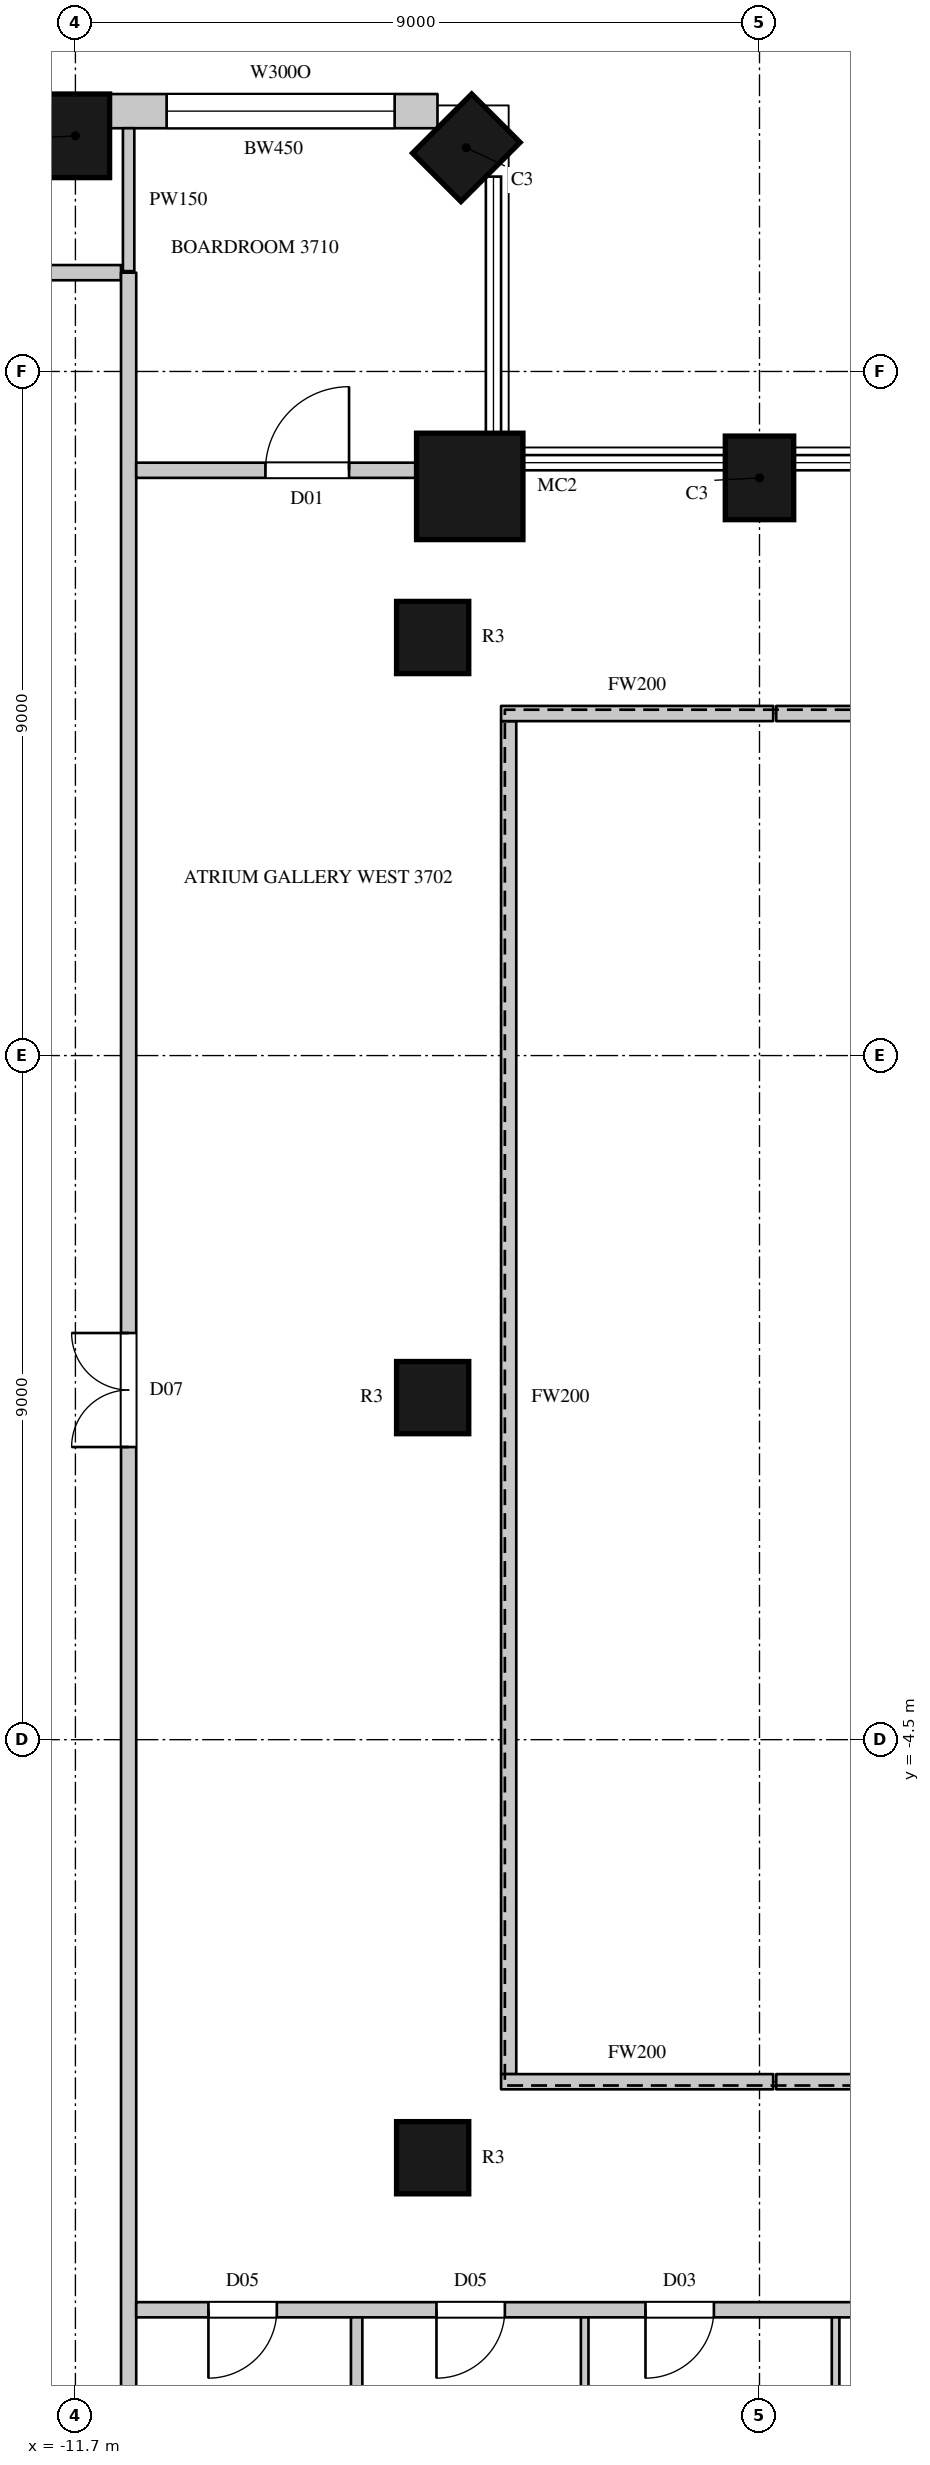
"""IFC4 building model, lengths in metres.
Left out: names, types, materials, properties, quantities, classifications, styles, units other than length and angle.
Written with IfcOpenShell. Run it as: python <this file> out.ifc"""

import sys

from ifc_helpers import new_model, si_unit, direction, frame, frame_2d, origin, origin_2d, place, context, subcontext, project, spatial, rectangle, circle, extrude, element, fill, save


model = new_model("IFC4")
c1 = context("Model", 3, precision=1e-05, world=origin(), true_north=direction((0.0, 1.0)))
c2 = subcontext(c1, "Body", "Model", "MODEL_VIEW")
j1 = project(units=[si_unit("LENGTHUNIT", "METRE"), si_unit("PLANEANGLEUNIT", "RADIAN")], contexts=[c1])
p1 = place(None, origin())
s1 = spatial("IfcSite", under=j1, at=p1, CompositionType="ELEMENT")
p2 = place(p1, origin())
s2 = spatial("IfcBuilding", under=s1, at=p2, CompositionType="ELEMENT")
p3 = place(p2, frame((0.0, 0.0, 172.8)))
s3 = spatial("IfcBuildingStorey", under=s2, at=p3, CompositionType="ELEMENT", Elevation=172.8)
p4 = place(p3, frame((-2.7, 12.1, 0.0), z_axis=(0.0, 0.0, 1.0), x_axis=(-1.0, 0.0, 0.0)))
e1 = element("IfcColumn", 1, at=p4, inside=s3, PredefinedType="COLUMN", context=c2, shape_type="SweptSolid", body=[
    extrude(rectangle(XDim=0.9, YDim=1.1, at=origin_2d()), origin(), (0.0, 0.0, 1.0), 4.1),
])
p5 = place(p3, frame((-6.512, 11.988, 0.0), z_axis=(0.0, 0.0, 1.0), x_axis=(1.0, 0.0, 0.0)))
e2 = element("IfcColumn", 2, at=p5, inside=s3, PredefinedType="COLUMN", context=c2, shape_type="SweptSolid", body=[
    extrude(circle(Radius=0.7, at=origin_2d()), origin(), (0.0, 0.0, 1.0), 4.1),
])
for number, where, z_axis, x_axis in (
    (3, (-6.557, 16.443, 0.0), (0.0, 0.0, 1.0), (-0.707, 0.707, 0.0)),
    (4, (-11.7, 16.6, 0.0), (0.0, 0.0, 1.0), (-1.0, 0.0, 0.0)),
):
    element("IfcColumn", number, at=place(p3, frame(where, z_axis=z_axis, x_axis=x_axis)), inside=s3, PredefinedType="COLUMN", context=c2, shape_type="SweptSolid", body=[
        extrude(rectangle(XDim=0.9, YDim=1.1, at=origin_2d()), origin(), (0.0, 0.0, 1.0), 4.1),
    ])
for number, where, z_axis, x_axis in (
    (5, (-7.0, -10.0, 0.0), (0.0, 0.0, 1.0), (1.0, 0.0, 0.0)),
    (6, (-7.0, 0.0, 0.0), (0.0, 0.0, 1.0), (1.0, 0.0, 0.0)),
    (7, (-7.0, 10.0, 0.0), (0.0, 0.0, 1.0), (1.0, 0.0, 0.0)),
):
    element("IfcColumn", number, at=place(p3, frame(where, z_axis=z_axis, x_axis=x_axis)), inside=s3, PredefinedType="COLUMN", context=c2, shape_type="SweptSolid", body=[
        extrude(circle(Radius=0.475, at=origin_2d()), origin(), (0.0, 0.0, 1.0), 4.1),
    ])
p6 = place(p3, frame((-6.936, 16.925, 0.0), z_axis=(0.0, 0.0, 1.0), x_axis=(-1.0, 0.0, 0.0)))
e8 = element("IfcWall", 8, at=p6, inside=s3, PredefinedType="SOLIDWALL", context=c2, shape_type="SweptSolid", body=[
    extrude(rectangle(XDim=4.314, YDim=0.45, at=frame_2d((2.157, 0.0))), origin(), (0.0, 0.0, 1.0), 3.8),
])
p7 = place(p6, frame((0.564, 0.0, 1.05)))
e9 = element("IfcOpeningElement", 9, at=p7, cuts=e8, PredefinedType="OPENING", context=c2, shape_type="SweptSolid", body=[
    extrude(rectangle(XDim=3.0, YDim=2.4, at=frame_2d((1.5, 1.2))), frame((0.0, 0.235, 0.0), z_axis=(0.0, -1.0, 0.0), x_axis=(1.0, 0.0, 0.0)), (0.0, 0.0, 1.0), 0.47),
])
p8 = place(p3, frame((-13.97, 14.8, 0.0), z_axis=(0.0, 0.0, 1.0), x_axis=(1.0, 0.0, 0.0)))
e10 = element("IfcWall", 10, at=p8, inside=s3, PredefinedType="PARTITIONING", context=c2, shape_type="SweptSolid", body=[
    extrude(rectangle(XDim=2.87, YDim=0.2, at=frame_2d((1.435, 0.0))), origin(), (0.0, 0.0, 1.0), 3.8),
])
p9 = place(p3, frame((-11.0, -14.8, 0.0), z_axis=(0.0, 0.0, 1.0), x_axis=(0.0, 1.0, 0.0)))
e11 = element("IfcWall", 11, at=p9, inside=s3, PredefinedType="PARTITIONING", context=c2, shape_type="SweptSolid", body=[
    extrude(rectangle(XDim=29.6, YDim=0.2, at=frame_2d((14.8, 0.0))), origin(), (0.0, 0.0, 1.0), 3.8),
])
p10 = place(p9, frame((14.15, 0.0, 0.0)))
e12 = element("IfcOpeningElement", 12, at=p10, cuts=e11, PredefinedType="OPENING", context=c2, shape_type="SweptSolid", body=[
    extrude(rectangle(XDim=1.5, YDim=2.4, at=frame_2d((0.75, 1.2))), frame((0.0, 0.11, 0.0), z_axis=(0.0, -1.0, 0.0), x_axis=(1.0, 0.0, 0.0)), (0.0, 0.0, 1.0), 0.22),
])
p11 = place(p3, frame((-10.9, -12.0, 0.0), z_axis=(0.0, 0.0, 1.0), x_axis=(1.0, 0.0, 0.0)))
e13 = element("IfcWall", 13, at=p11, inside=s3, PredefinedType="PARTITIONING", context=c2, shape_type="SweptSolid", body=[
    extrude(rectangle(XDim=21.8, YDim=0.2, at=frame_2d((10.9, 0.0))), origin(), (0.0, 0.0, 1.0), 3.8),
])
p12 = place(p11, frame((0.95, 0.0, 0.0)))
e14 = element("IfcOpeningElement", 14, at=p12, cuts=e13, PredefinedType="OPENING", context=c2, shape_type="SweptSolid", body=[
    extrude(rectangle(XDim=0.9, YDim=2.2, at=frame_2d((0.45, 1.1))), frame((0.0, 0.11, 0.0), z_axis=(0.0, -1.0, 0.0), x_axis=(1.0, 0.0, 0.0)), (0.0, 0.0, 1.0), 0.22),
])
p13 = place(p11, frame((3.95, 0.0, 0.0)))
e15 = element("IfcOpeningElement", 15, at=p13, cuts=e13, PredefinedType="OPENING", context=c2, shape_type="SweptSolid", body=[
    extrude(rectangle(XDim=0.9, YDim=2.2, at=frame_2d((0.45, 1.1))), frame((0.0, 0.11, 0.0), z_axis=(0.0, -1.0, 0.0), x_axis=(1.0, 0.0, 0.0)), (0.0, 0.0, 1.0), 0.22),
])
p14 = place(p11, frame((6.7, 0.0, 0.0)))
e16 = element("IfcOpeningElement", 16, at=p14, cuts=e13, PredefinedType="OPENING", context=c2, shape_type="SweptSolid", body=[
    extrude(rectangle(XDim=0.9, YDim=2.2, at=frame_2d((0.45, 1.1))), frame((0.0, 0.11, 0.0), z_axis=(0.0, -1.0, 0.0), x_axis=(1.0, 0.0, 0.0)), (0.0, 0.0, 1.0), 0.22),
])
p15 = place(p11, frame((10.0, 0.0, 0.0)))
e17 = element("IfcOpeningElement", 17, at=p15, cuts=e13, PredefinedType="OPENING", context=c2, shape_type="SweptSolid", body=[
    extrude(rectangle(XDim=0.9, YDim=2.2, at=frame_2d((0.45, 1.1))), frame((0.0, 0.11, 0.0), z_axis=(0.0, -1.0, 0.0), x_axis=(1.0, 0.0, 0.0)), (0.0, 0.0, 1.0), 0.22),
])
p16 = place(p11, frame((13.55, 0.0, 0.0)))
e18 = element("IfcOpeningElement", 18, at=p16, cuts=e13, PredefinedType="OPENING", context=c2, shape_type="SweptSolid", body=[
    extrude(rectangle(XDim=0.9, YDim=2.2, at=frame_2d((0.45, 1.1))), frame((0.0, 0.11, 0.0), z_axis=(0.0, -1.0, 0.0), x_axis=(1.0, 0.0, 0.0)), (0.0, 0.0, 1.0), 0.22),
])
p17 = place(p11, frame((15.8, 0.0, 0.0)))
e19 = element("IfcOpeningElement", 19, at=p17, cuts=e13, PredefinedType="OPENING", context=c2, shape_type="SweptSolid", body=[
    extrude(rectangle(XDim=1.1, YDim=2.4, at=frame_2d((0.55, 1.2))), frame((0.0, 0.11, 0.0), z_axis=(0.0, -1.0, 0.0), x_axis=(1.0, 0.0, 0.0)), (0.0, 0.0, 1.0), 0.22),
])
p18 = place(p11, frame((18.0, 0.0, 0.0)))
e20 = element("IfcOpeningElement", 20, at=p18, cuts=e13, PredefinedType="OPENING", context=c2, shape_type="SweptSolid", body=[
    extrude(rectangle(XDim=1.1, YDim=2.4, at=frame_2d((0.55, 1.2))), frame((0.0, 0.11, 0.0), z_axis=(0.0, -1.0, 0.0), x_axis=(1.0, 0.0, 0.0)), (0.0, 0.0, 1.0), 0.22),
])
p19 = place(p3, frame((-10.9, 12.2, 0.0), z_axis=(0.0, 0.0, 1.0), x_axis=(1.0, 0.0, 0.0)))
e21 = element("IfcWall", 21, at=p19, inside=s3, PredefinedType="PARTITIONING", context=c2, shape_type="SweptSolid", body=[
    extrude(rectangle(XDim=3.704, YDim=0.2, at=frame_2d((1.852, 0.0))), origin(), (0.0, 0.0, 1.0), 3.8),
])
p20 = place(p19, frame((1.7, 0.0, 0.0)))
e22 = element("IfcOpeningElement", 22, at=p20, cuts=e21, PredefinedType="OPENING", context=c2, shape_type="SweptSolid", body=[
    extrude(rectangle(XDim=1.1, YDim=2.4, at=frame_2d((0.55, 1.2))), frame((0.0, 0.11, 0.0), z_axis=(0.0, -1.0, 0.0), x_axis=(1.0, 0.0, 0.0)), (0.0, 0.0, 1.0), 0.22),
])
p21 = place(p3, frame((-6.0, -8.9, 0.0), z_axis=(0.0, 0.0, 1.0), x_axis=(0.0, 1.0, 0.0)))
e23 = element("IfcWall", 23, at=p21, inside=s3, PredefinedType="PARTITIONING", context=c2, shape_type="SweptSolid", body=[
    extrude(rectangle(XDim=17.8, YDim=0.2, at=frame_2d((8.9, 0.0))), origin(), (0.0, 0.0, 1.0), 3.8),
])
for number, where, z_axis, x_axis in (
    (24, (-6.1, -9.0, 0.0), (0.0, 0.0, 1.0), (1.0, 0.0, 0.0)),
    (25, (-6.1, 9.0, 0.0), (0.0, 0.0, 1.0), (1.0, 0.0, 0.0)),
):
    element("IfcWall", number, at=place(p3, frame(where, z_axis=z_axis, x_axis=x_axis)), inside=s3, PredefinedType="PARTITIONING", context=c2, shape_type="SweptSolid", body=[
        extrude(rectangle(XDim=3.58, YDim=0.2, at=frame_2d((1.79, 0.0))), origin(), (0.0, 0.0, 1.0), 3.8),
    ])
for number, where, z_axis, x_axis in (
    (26, (-2.48, -9.0, 0.0), (0.0, 0.0, 1.0), (1.0, 0.0, 0.0)),
    (27, (-2.48, 9.0, 0.0), (0.0, 0.0, 1.0), (1.0, 0.0, 0.0)),
):
    element("IfcWall", number, at=place(p3, frame(where, z_axis=z_axis, x_axis=x_axis)), inside=s3, PredefinedType="PARTITIONING", context=c2, shape_type="SweptSolid", body=[
        extrude(rectangle(XDim=10.58, YDim=0.2, at=frame_2d((5.29, 0.0))), origin(), (0.0, 0.0, 1.0), 3.8),
    ])
p22 = place(p3, frame((-11.0, 14.82, 0.0), z_axis=(0.0, 0.0, 1.0), x_axis=(0.0, 1.0, 0.0)))
e28 = element("IfcWall", 28, at=p22, inside=s3, PredefinedType="PARTITIONING", context=c2, shape_type="SweptSolid", body=[
    extrude(rectangle(XDim=1.88, YDim=0.15, at=frame_2d((0.94, 0.0))), origin(), (0.0, 0.0, 1.0), 3.8),
])
p23 = place(p3, frame((-8.0, -16.7, 0.0), z_axis=(0.0, 0.0, 1.0), x_axis=(0.0, 1.0, 0.0)))
e29 = element("IfcWall", 29, at=p23, inside=s3, PredefinedType="PARTITIONING", context=c2, shape_type="SweptSolid", body=[
    extrude(rectangle(XDim=4.6, YDim=0.15, at=frame_2d((2.3, 0.0))), origin(), (0.0, 0.0, 1.0), 3.8),
])
for number, where, z_axis, x_axis in (
    (30, (-5.0, -16.7, 0.0), (0.0, 0.0, 1.0), (0.0, 1.0, 0.0)),
    (31, (-1.699, -16.7, 0.0), (0.0, 0.0, 1.0), (0.0, 1.0, 0.0)),
):
    element("IfcWall", number, at=place(p3, frame(where, z_axis=z_axis, x_axis=x_axis)), inside=s3, PredefinedType="PARTITIONING", context=c2, shape_type="SweptSolid", body=[
        extrude(rectangle(XDim=4.6, YDim=0.1, at=frame_2d((2.3, 0.0))), origin(), (0.0, 0.0, 1.0), 3.8),
    ])
p24 = place(p7, origin())
e32 = element("IfcWindow", 32, at=p24, inside=s3, PartitioningType="SINGLE_PANEL", PredefinedType="WINDOW", context=c2, shape_type="SweptSolid", body=[
    extrude(rectangle(XDim=3.0, YDim=2.4, at=frame_2d((1.5, 1.2))), frame((0.0, 0.135, 0.0), z_axis=(0.0, -1.0, 0.0), x_axis=(1.0, 0.0, 0.0)), (0.0, 0.0, 1.0), 0.06),
])
fill(e9, e32)
p25 = place(p10, origin())
e33 = element("IfcDoor", 33, at=p25, inside=s3, OperationType="DOUBLE_DOOR_SINGLE_SWING", PredefinedType="DOOR", context=c2, shape_type="SweptSolid", body=[
    extrude(rectangle(XDim=1.5, YDim=2.4, at=frame_2d((0.75, 1.2))), frame((0.0, 0.025, 0.0), z_axis=(0.0, -1.0, 0.0), x_axis=(1.0, 0.0, 0.0)), (0.0, 0.0, 1.0), 0.05),
])
fill(e12, e33)
p26 = place(p12, origin())
e34 = element("IfcDoor", 34, at=p26, inside=s3, OperationType="SINGLE_SWING_RIGHT", PredefinedType="DOOR", context=c2, shape_type="SweptSolid", body=[
    extrude(rectangle(XDim=0.9, YDim=2.2, at=frame_2d((0.45, 1.1))), frame((0.0, 0.025, 0.0), z_axis=(0.0, -1.0, 0.0), x_axis=(1.0, 0.0, 0.0)), (0.0, 0.0, 1.0), 0.05),
])
fill(e14, e34)
p27 = place(p13, origin())
e35 = element("IfcDoor", 35, at=p27, inside=s3, OperationType="SINGLE_SWING_RIGHT", PredefinedType="DOOR", context=c2, shape_type="SweptSolid", body=[
    extrude(rectangle(XDim=0.9, YDim=2.2, at=frame_2d((0.45, 1.1))), frame((0.0, 0.025, 0.0), z_axis=(0.0, -1.0, 0.0), x_axis=(1.0, 0.0, 0.0)), (0.0, 0.0, 1.0), 0.05),
])
fill(e15, e35)
p28 = place(p14, origin())
e36 = element("IfcDoor", 36, at=p28, inside=s3, OperationType="SINGLE_SWING_RIGHT", PredefinedType="DOOR", context=c2, shape_type="SweptSolid", body=[
    extrude(rectangle(XDim=0.9, YDim=2.2, at=frame_2d((0.45, 1.1))), frame((0.0, 0.025, 0.0), z_axis=(0.0, -1.0, 0.0), x_axis=(1.0, 0.0, 0.0)), (0.0, 0.0, 1.0), 0.05),
])
fill(e16, e36)
p29 = place(p20, origin())
e37 = element("IfcDoor", 37, at=p29, inside=s3, OperationType="SINGLE_SWING_RIGHT", PredefinedType="DOOR", context=c2, shape_type="SweptSolid", body=[
    extrude(rectangle(XDim=1.1, YDim=2.4, at=frame_2d((0.55, 1.2))), frame((0.0, 0.025, 0.0), z_axis=(0.0, -1.0, 0.0), x_axis=(1.0, 0.0, 0.0)), (0.0, 0.0, 1.0), 0.05),
])
fill(e22, e37)
save(model, sys.argv[1])
